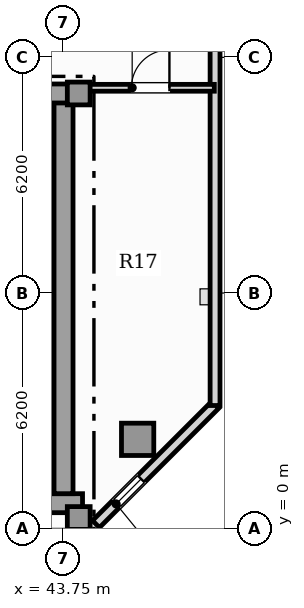
"""IFC4 building model, lengths in metres.
Left out: names, types, materials, properties, quantities, classifications, styles, units other than length and angle.
Written with IfcOpenShell. Run it as: python <this file> out.ifc"""

import sys

from ifc_helpers import new_model, si_unit, direction, frame, frame_2d, origin, origin_2d, place, context, subcontext, project, spatial, rectangle, hollow_rectangle, extrude, element, fill, save


model = new_model("IFC4")
c1 = context("Model", 3, precision=1e-05, world=origin(), true_north=direction((0.0, 1.0)))
c2 = subcontext(c1, "Body", "Model", "MODEL_VIEW")
j1 = project(units=[si_unit("LENGTHUNIT", "METRE"), si_unit("PLANEANGLEUNIT", "RADIAN")], contexts=[c1])
p1 = place(None, origin())
s1 = spatial("IfcSite", under=j1, at=p1, CompositionType="ELEMENT")
p2 = place(p1, origin())
s2 = spatial("IfcBuilding", under=s1, at=p2, CompositionType="ELEMENT")
p3 = place(p2, frame((0.0, 0.0, 353.45)))
s3 = spatial("IfcBuildingStorey", under=s2, at=p3, CompositionType="ELEMENT", Elevation=353.45)
p4 = place(p3, frame((13.25, 0.67, 0.0), z_axis=(0.0, 0.0, 1.0), x_axis=(1.0, 0.0, 0.0)))
e1 = element("IfcWall", 1, at=p4, inside=s3, PredefinedType="SHEAR", context=c2, shape_type="SweptSolid", body=[
    extrude(rectangle(XDim=31.0, YDim=0.5, at=frame_2d((15.5, 0.0))), origin(), (0.0, 0.0, 1.0), 4.14),
])
p5 = place(p3, frame((43.75, 0.92, 0.0), z_axis=(0.0, 0.0, 1.0), x_axis=(0.0, 1.0, 0.0)))
e2 = element("IfcWall", 2, at=p5, inside=s3, PredefinedType="SHEAR", context=c2, shape_type="SweptSolid", body=[
    extrude(rectangle(XDim=10.53, YDim=0.5, at=frame_2d((5.265, 0.0))), origin(), (0.0, 0.0, 1.0), 4.14),
])
p6 = place(p3, frame((41.3, 11.45, 0.0), z_axis=(0.0, 0.0, 1.0), x_axis=(1.0, 0.0, 0.0)))
e3 = element("IfcWall", 3, at=p6, inside=s3, PredefinedType="SHEAR", context=c2, shape_type="SweptSolid", body=[
    extrude(rectangle(XDim=2.95, YDim=0.5, at=frame_2d((1.475, 0.0))), origin(), (0.0, 0.0, 1.0), 4.14),
])
for number, where, z_axis, x_axis in (
    (4, (44.15, 0.28, 0.0), (0.0, 0.0, 1.0), (1.0, 0.0, 0.0)),
    (5, (44.15, 11.45, 0.0), (0.0, 0.0, 1.0), (1.0, 0.0, 0.0)),
):
    element("IfcColumn", number, at=place(p3, frame(where, z_axis=z_axis, x_axis=x_axis)), inside=s3, PredefinedType="COLUMN", context=c2, shape_type="SweptSolid", body=[
        extrude(rectangle(XDim=0.6, YDim=0.6, at=origin_2d()), origin(), (0.0, 0.0, 1.0), 4.4),
    ])
p7 = place(p3, frame((45.7, 2.35, 0.0), z_axis=(0.0, 0.0, 1.0), x_axis=(1.0, 0.0, 0.0)))
e6 = element("IfcColumn", 6, at=p7, inside=s3, PredefinedType="USERDEFINED", context=c2, shape_type="SweptSolid", body=[
    extrude(hollow_rectangle(XDim=0.85, YDim=0.85, WallThickness=0.05, at=origin_2d()), origin(), (0.0, 0.0, 1.0), 4.4),
])
p8 = place(p3, frame((44.604, 0.12, 0.0), z_axis=(0.0, 0.0, 1.0), x_axis=(0.707106781187, 0.707106781187, 0.0)))
e7 = element("IfcWall", 7, at=p8, inside=s3, PredefinedType="SOLIDWALL", context=c2, shape_type="SweptSolid", body=[
    extrude(rectangle(XDim=4.446, YDim=0.26, at=frame_2d((2.223, 0.0))), origin(), (0.0, 0.0, 1.0), 4.14),
])
p9 = place(p8, frame((0.78, 0.0, 0.95)))
e8 = element("IfcOpeningElement", 8, at=p9, cuts=e7, PredefinedType="OPENING", context=c2, shape_type="SweptSolid", body=[
    extrude(rectangle(XDim=0.9, YDim=1.5, at=frame_2d((0.45, 0.75))), frame((0.0, 0.14, 0.0), z_axis=(0.0, -1.0, 0.0), x_axis=(1.0, 0.0, 0.0)), (0.0, 0.0, 1.0), 0.28),
])
p10 = place(p3, frame((47.737, 3.24, 0.0), z_axis=(0.0, 0.0, 1.0), x_axis=(0.0, 1.0, 0.0)))
e9 = element("IfcWall", 9, at=p10, inside=s3, PredefinedType="SOLIDWALL", context=c2, shape_type="SweptSolid", body=[
    extrude(rectangle(XDim=24.551, YDim=0.26, at=frame_2d((12.276, 0.0))), origin(), (0.0, 0.0, 1.0), 4.14),
])
p11 = place(p10, frame((20.821, 0.0, 0.95)))
e10 = element("IfcOpeningElement", 10, at=p11, cuts=e9, PredefinedType="OPENING", context=c2, shape_type="SweptSolid", body=[
    extrude(rectangle(XDim=0.9, YDim=1.5, at=frame_2d((0.45, 0.75))), frame((0.0, 0.14, 0.0), z_axis=(0.0, -1.0, 0.0), x_axis=(1.0, 0.0, 0.0)), (0.0, 0.0, 1.0), 0.28),
])
p12 = place(p10, frame((10.415, 0.0, 0.95)))
e11 = element("IfcOpeningElement", 11, at=p12, cuts=e9, PredefinedType="OPENING", context=c2, shape_type="SweptSolid", body=[
    extrude(rectangle(XDim=0.9, YDim=1.5, at=frame_2d((0.45, 0.75))), frame((0.0, 0.14, 0.0), z_axis=(0.0, -1.0, 0.0), x_axis=(1.0, 0.0, 0.0)), (0.0, 0.0, 1.0), 0.28),
])
p13 = place(p10, frame((12.599, 0.0, 0.88)))
e12 = element("IfcOpeningElement", 12, at=p13, cuts=e9, PredefinedType="OPENING", context=c2, shape_type="SweptSolid", body=[
    extrude(rectangle(XDim=1.65, YDim=2.0, at=frame_2d((0.825, 1.0))), frame((0.0, 0.14, 0.0), z_axis=(0.0, -1.0, 0.0), x_axis=(1.0, 0.0, 0.0)), (0.0, 0.0, 1.0), 0.28),
])
p14 = place(p10, frame((16.969, 0.0, 0.88)))
e13 = element("IfcOpeningElement", 13, at=p14, cuts=e9, PredefinedType="OPENING", context=c2, shape_type="SweptSolid", body=[
    extrude(rectangle(XDim=1.65, YDim=2.0, at=frame_2d((0.825, 1.0))), frame((0.0, 0.14, 0.0), z_axis=(0.0, -1.0, 0.0), x_axis=(1.0, 0.0, 0.0)), (0.0, 0.0, 1.0), 0.28),
])
p15 = place(p10, frame((22.871, 0.0, 0.95)))
e14 = element("IfcOpeningElement", 14, at=p15, cuts=e9, PredefinedType="OPENING", context=c2, shape_type="SweptSolid", body=[
    extrude(rectangle(XDim=0.9, YDim=1.5, at=frame_2d((0.45, 0.75))), frame((0.0, 0.14, 0.0), z_axis=(0.0, -1.0, 0.0), x_axis=(1.0, 0.0, 0.0)), (0.0, 0.0, 1.0), 0.28),
])
p16 = place(p3, frame((40.06, 8.52, 0.0), z_axis=(0.0, 0.0, 1.0), x_axis=(1.0, 0.0, 0.0)))
e15 = element("IfcWall", 15, at=p16, inside=s3, PredefinedType="SOLIDWALL", context=c2, shape_type="SweptSolid", body=[
    extrude(rectangle(XDim=3.4, YDim=0.22, at=frame_2d((1.7, 0.0))), origin(), (0.0, 0.0, 1.0), 4.14),
])
p17 = place(p16, frame((1.125, 0.0, 0.0)))
e16 = element("IfcOpeningElement", 16, at=p17, cuts=e15, PredefinedType="OPENING", context=c2, shape_type="SweptSolid", body=[
    extrude(rectangle(XDim=1.15, YDim=2.2, at=frame_2d((0.575, 1.1))), frame((0.0, 0.12, 0.0), z_axis=(0.0, -1.0, 0.0), x_axis=(1.0, 0.0, 0.0)), (0.0, 0.0, 1.0), 0.24),
])
p18 = place(p3, frame((44.355, 11.6, 0.0), z_axis=(0.0, 0.0, 1.0), x_axis=(1.0, 0.0, 0.0)))
e17 = element("IfcWall", 17, at=p18, inside=s3, PredefinedType="PARTITIONING", context=c2, shape_type="SweptSolid", body=[
    extrude(rectangle(XDim=3.363, YDim=0.18, at=frame_2d((1.681, 0.0))), origin(), (0.0, 0.0, 1.0), 4.14),
])
p19 = place(p18, frame((1.181, 0.0, 0.0)))
e18 = element("IfcOpeningElement", 18, at=p19, cuts=e17, PredefinedType="OPENING", context=c2, shape_type="SweptSolid", body=[
    extrude(rectangle(XDim=1.0, YDim=2.15, at=frame_2d((0.5, 1.075))), frame((0.0, 0.1, 0.0), z_axis=(0.0, -1.0, 0.0), x_axis=(1.0, 0.0, 0.0)), (0.0, 0.0, 1.0), 0.2),
])
p20 = place(p9, origin())
e19 = element("IfcWindow", 19, at=p20, inside=s3, PartitioningType="SINGLE_PANEL", PredefinedType="WINDOW", context=c2, shape_type="SweptSolid", body=[
    extrude(rectangle(XDim=0.9, YDim=1.5, at=frame_2d((0.45, 0.75))), frame((0.0, 0.03, 0.0), z_axis=(0.0, -1.0, 0.0), x_axis=(1.0, 0.0, 0.0)), (0.0, 0.0, 1.0), 0.06),
])
fill(e8, e19)
p21 = place(p19, origin())
e20 = element("IfcDoor", 20, at=p21, inside=s3, OperationType="SINGLE_SWING_RIGHT", PredefinedType="DOOR", context=c2, shape_type="SweptSolid", body=[
    extrude(rectangle(XDim=1.0, YDim=2.15, at=frame_2d((0.5, 1.075))), frame((0.0, 0.025, 0.0), z_axis=(0.0, -1.0, 0.0), x_axis=(1.0, 0.0, 0.0)), (0.0, 0.0, 1.0), 0.05),
])
fill(e18, e20)
save(model, sys.argv[1])
